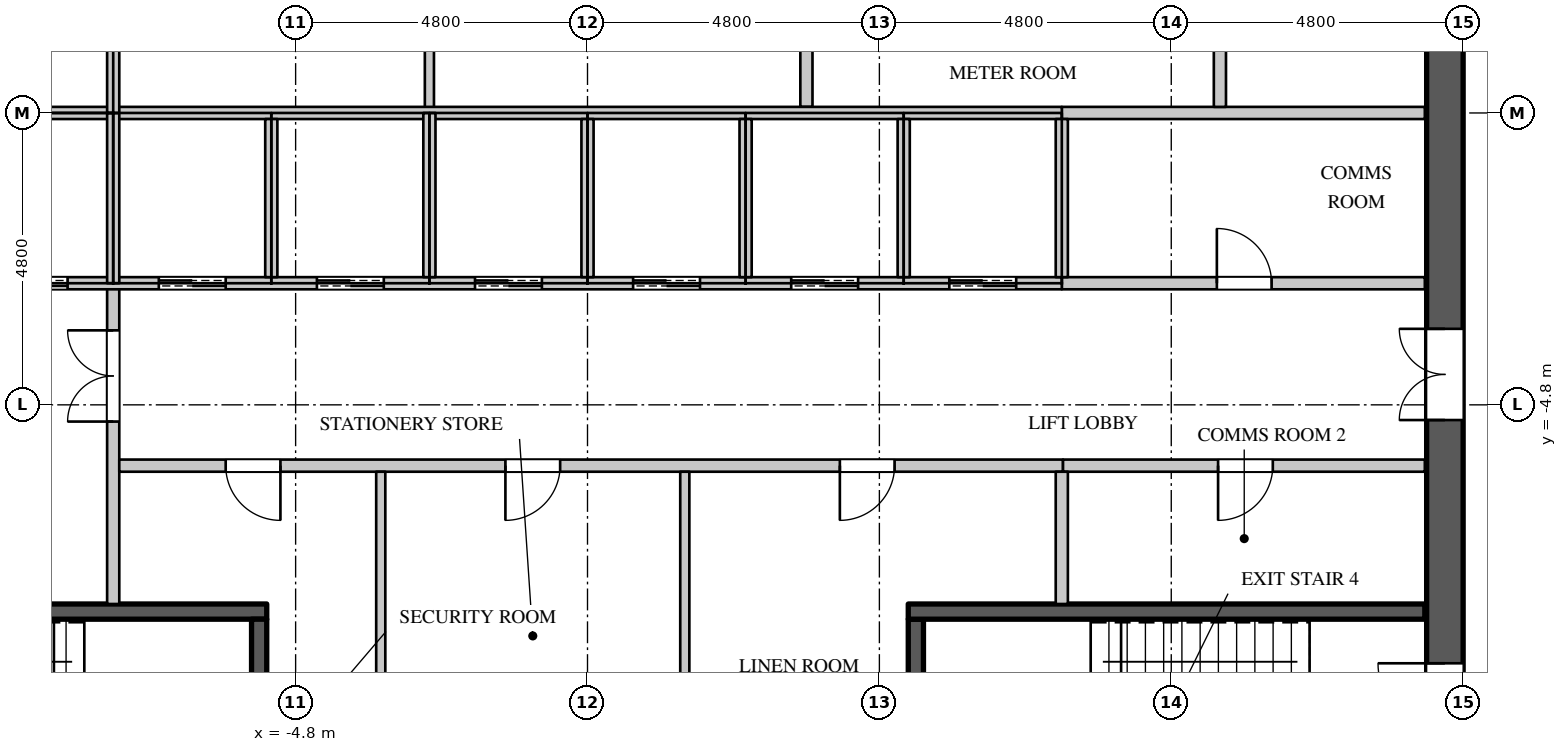
"""IFC4 building model, lengths in metres.
Left out: names, types, materials, properties, quantities, classifications, styles, units other than length and angle.
Written with IfcOpenShell. Run it as: python <this file> out.ifc"""

import sys

from ifc_helpers import new_model, si_unit, direction, frame, frame_2d, origin, place, context, subcontext, project, spatial, rectangle, extrude, element, fill, save


model = new_model("IFC4")
c1 = context("Model", 3, precision=1e-05, world=origin(), true_north=direction((0.0, 1.0)))
c2 = subcontext(c1, "Body", "Model", "MODEL_VIEW")
j1 = project(units=[si_unit("LENGTHUNIT", "METRE"), si_unit("PLANEANGLEUNIT", "RADIAN")], contexts=[c1])
p1 = place(None, origin())
s1 = spatial("IfcSite", under=j1, at=p1, CompositionType="ELEMENT")
p2 = place(p1, origin())
s2 = spatial("IfcBuilding", under=s1, at=p2, CompositionType="ELEMENT")
p3 = place(p2, frame((0.0, 0.0, 247.5)))
s3 = spatial("IfcBuildingStorey", under=s2, at=p3, CompositionType="ELEMENT", Elevation=247.5)
p4 = place(p3, frame((14.1, -11.4, 0.0), z_axis=(0.0, 0.0, 1.0), x_axis=(0.0, 1.0, 0.0)))
e1 = element("IfcWall", 1, at=p4, inside=s3, PredefinedType="SHEAR", context=c2, shape_type="SweptSolid", body=[
    extrude(rectangle(XDim=22.8, YDim=0.6, at=frame_2d((11.4, 0.0))), origin(), (0.0, 0.0, 1.0), 4.2),
])
p5 = place(p4, frame((20.45, 0.0, 0.0)))
e2 = element("IfcOpeningElement", 2, at=p5, cuts=e1, PredefinedType="OPENING", context=c2, shape_type="SweptSolid", body=[
    extrude(rectangle(XDim=1.1, YDim=2.2, at=frame_2d((0.55, 1.1))), frame((0.0, 0.31, 0.0), z_axis=(0.0, -1.0, 0.0), x_axis=(1.0, 0.0, 0.0)), (0.0, 0.0, 1.0), 0.62),
])
p6 = place(p4, frame((1.25, 0.0, 0.0)))
e3 = element("IfcOpeningElement", 3, at=p6, cuts=e1, PredefinedType="OPENING", context=c2, shape_type="SweptSolid", body=[
    extrude(rectangle(XDim=1.1, YDim=2.2, at=frame_2d((0.55, 1.1))), frame((0.0, 0.31, 0.0), z_axis=(0.0, -1.0, 0.0), x_axis=(1.0, 0.0, 0.0)), (0.0, 0.0, 1.0), 0.62),
])
p7 = place(p4, frame((14.95, 0.0, 0.0)))
e4 = element("IfcOpeningElement", 4, at=p7, cuts=e1, PredefinedType="OPENING", context=c2, shape_type="SweptSolid", body=[
    extrude(rectangle(XDim=1.5, YDim=2.4, at=frame_2d((0.75, 1.2))), frame((0.0, 0.31, 0.0), z_axis=(0.0, -1.0, 0.0), x_axis=(1.0, 0.0, 0.0)), (0.0, 0.0, 1.0), 0.62),
])
p8 = place(p4, frame((6.35, 0.0, 0.0)))
e5 = element("IfcOpeningElement", 5, at=p8, cuts=e1, PredefinedType="OPENING", context=c2, shape_type="SweptSolid", body=[
    extrude(rectangle(XDim=1.5, YDim=2.4, at=frame_2d((0.75, 1.2))), frame((0.0, 0.31, 0.0), z_axis=(0.0, -1.0, 0.0), x_axis=(1.0, 0.0, 0.0)), (0.0, 0.0, 1.0), 0.62),
])
p9 = place(p3, frame((-7.8, -8.075, 0.0), z_axis=(0.0, 0.0, 1.0), x_axis=(0.0, 1.0, 0.0)))
e6 = element("IfcWall", 6, at=p9, inside=s3, PredefinedType="PARTITIONING", context=c2, shape_type="SweptSolid", body=[
    extrude(rectangle(XDim=5.275, YDim=0.2, at=frame_2d((2.637, 0.0))), origin(), (0.0, 0.0, 1.0), 3.95),
])
p10 = place(p9, frame((3.0, 0.0, 0.0)))
e7 = element("IfcOpeningElement", 7, at=p10, cuts=e6, PredefinedType="OPENING", context=c2, shape_type="SweptSolid", body=[
    extrude(rectangle(XDim=1.5, YDim=2.4, at=frame_2d((0.75, 1.2))), frame((0.0, 0.11, 0.0), z_axis=(0.0, -1.0, 0.0), x_axis=(1.0, 0.0, 0.0)), (0.0, 0.0, 1.0), 0.22),
])
p11 = place(p3, frame((-7.7, -5.8, 0.0), z_axis=(0.0, 0.0, 1.0), x_axis=(1.0, 0.0, 0.0)))
e8 = element("IfcWall", 8, at=p11, inside=s3, PredefinedType="PARTITIONING", context=c2, shape_type="SweptSolid", body=[
    extrude(rectangle(XDim=15.52, YDim=0.2, at=frame_2d((7.76, 0.0))), origin(), (0.0, 0.0, 1.0), 3.95),
])
p12 = place(p11, frame((1.75, 0.0, 0.0)))
e9 = element("IfcOpeningElement", 9, at=p12, cuts=e8, PredefinedType="OPENING", context=c2, shape_type="SweptSolid", body=[
    extrude(rectangle(XDim=0.9, YDim=2.2, at=frame_2d((0.45, 1.1))), frame((0.0, 0.11, 0.0), z_axis=(0.0, -1.0, 0.0), x_axis=(1.0, 0.0, 0.0)), (0.0, 0.0, 1.0), 0.22),
])
p13 = place(p11, frame((6.35, 0.0, 0.0)))
e10 = element("IfcOpeningElement", 10, at=p13, cuts=e8, PredefinedType="OPENING", context=c2, shape_type="SweptSolid", body=[
    extrude(rectangle(XDim=0.9, YDim=2.2, at=frame_2d((0.45, 1.1))), frame((0.0, 0.11, 0.0), z_axis=(0.0, -1.0, 0.0), x_axis=(1.0, 0.0, 0.0)), (0.0, 0.0, 1.0), 0.22),
])
p14 = place(p11, frame((11.85, 0.0, 0.0)))
e11 = element("IfcOpeningElement", 11, at=p14, cuts=e8, PredefinedType="OPENING", context=c2, shape_type="SweptSolid", body=[
    extrude(rectangle(XDim=0.9, YDim=2.2, at=frame_2d((0.45, 1.1))), frame((0.0, 0.11, 0.0), z_axis=(0.0, -1.0, 0.0), x_axis=(1.0, 0.0, 0.0)), (0.0, 0.0, 1.0), 0.22),
])
p15 = place(p3, frame((-3.4, -11.37, 0.0), z_axis=(0.0, 0.0, 1.0), x_axis=(0.0, 1.0, 0.0)))
e12 = element("IfcWall", 12, at=p15, inside=s3, PredefinedType="PARTITIONING", context=c2, shape_type="SweptSolid", body=[
    extrude(rectangle(XDim=5.47, YDim=0.15, at=frame_2d((2.735, 0.0))), origin(), (0.0, 0.0, 1.0), 3.95),
])
p16 = place(p3, frame((-2.6, 0.0, 0.0), z_axis=(0.0, 0.0, 1.0), x_axis=(0.0, 1.0, 0.0)))
e13 = element("IfcWall", 13, at=p16, inside=s3, PredefinedType="PARTITIONING", context=c2, shape_type="SweptSolid", body=[
    extrude(rectangle(XDim=2.7, YDim=0.15, at=frame_2d((1.35, 0.0))), origin(), (0.0, 0.0, 1.0), 3.95),
])
p17 = place(p3, frame((1.6, -11.37, 0.0), z_axis=(0.0, 0.0, 1.0), x_axis=(0.0, 1.0, 0.0)))
e14 = element("IfcWall", 14, at=p17, inside=s3, PredefinedType="PARTITIONING", context=c2, shape_type="SweptSolid", body=[
    extrude(rectangle(XDim=5.47, YDim=0.15, at=frame_2d((2.735, 0.0))), origin(), (0.0, 0.0, 1.0), 3.95),
])
p18 = place(p3, frame((3.6, 0.1, 0.0), z_axis=(0.0, 0.0, 1.0), x_axis=(0.0, 1.0, 0.0)))
e15 = element("IfcWall", 15, at=p18, inside=s3, PredefinedType="PARTITIONING", context=c2, shape_type="SweptSolid", body=[
    extrude(rectangle(XDim=2.6, YDim=0.2, at=frame_2d((1.3, 0.0))), origin(), (0.0, 0.0, 1.0), 3.95),
])
p19 = place(p3, frame((7.82, -5.8, 0.0), z_axis=(0.0, 0.0, 1.0), x_axis=(1.0, 0.0, 0.0)))
e16 = element("IfcWall", 16, at=p19, inside=s3, PredefinedType="PARTITIONING", context=c2, shape_type="SweptSolid", body=[
    extrude(rectangle(XDim=5.95, YDim=0.2, at=frame_2d((2.975, 0.0))), origin(), (0.0, 0.0, 1.0), 3.95),
])
p20 = place(p19, frame((2.55, 0.0, 0.0)))
e17 = element("IfcOpeningElement", 17, at=p20, cuts=e16, PredefinedType="OPENING", context=c2, shape_type="SweptSolid", body=[
    extrude(rectangle(XDim=0.9, YDim=2.2, at=frame_2d((0.45, 1.1))), frame((0.0, 0.11, 0.0), z_axis=(0.0, -1.0, 0.0), x_axis=(1.0, 0.0, 0.0)), (0.0, 0.0, 1.0), 0.22),
])
p21 = place(p3, frame((7.8, -2.8, 0.0), z_axis=(0.0, 0.0, 1.0), x_axis=(1.0, 0.0, 0.0)))
e18 = element("IfcWall", 18, at=p21, inside=s3, PredefinedType="PARTITIONING", context=c2, shape_type="SweptSolid", body=[
    extrude(rectangle(XDim=5.97, YDim=0.2, at=frame_2d((2.985, 0.0))), origin(), (0.0, 0.0, 1.0), 3.95),
])
p22 = place(p21, frame((2.55, 0.0, 0.0)))
e19 = element("IfcOpeningElement", 19, at=p22, cuts=e18, PredefinedType="OPENING", context=c2, shape_type="SweptSolid", body=[
    extrude(rectangle(XDim=0.9, YDim=2.2, at=frame_2d((0.45, 1.1))), frame((0.0, 0.11, 0.0), z_axis=(0.0, -1.0, 0.0), x_axis=(1.0, 0.0, 0.0)), (0.0, 0.0, 1.0), 0.22),
])
p23 = place(p3, frame((7.8, -8.075, 0.0), z_axis=(0.0, 0.0, 1.0), x_axis=(0.0, 1.0, 0.0)))
e20 = element("IfcWall", 20, at=p23, inside=s3, PredefinedType="PARTITIONING", context=c2, shape_type="SweptSolid", body=[
    extrude(rectangle(XDim=2.175, YDim=0.2, at=frame_2d((1.087, 0.0))), origin(), (0.0, 0.0, 1.0), 3.95),
])
p24 = place(p3, frame((7.8, 0.0, 0.0), z_axis=(0.0, 0.0, 1.0), x_axis=(1.0, 0.0, 0.0)))
e21 = element("IfcWall", 21, at=p24, inside=s3, PredefinedType="PARTITIONING", context=c2, shape_type="SweptSolid", body=[
    extrude(rectangle(XDim=5.97, YDim=0.2, at=frame_2d((2.985, 0.0))), origin(), (0.0, 0.0, 1.0), 3.95),
])
p25 = place(p3, frame((10.4, 0.1, 0.0), z_axis=(0.0, 0.0, 1.0), x_axis=(0.0, 1.0, 0.0)))
e22 = element("IfcWall", 22, at=p25, inside=s3, PredefinedType="PARTITIONING", context=c2, shape_type="SweptSolid", body=[
    extrude(rectangle(XDim=2.6, YDim=0.2, at=frame_2d((1.3, 0.0))), origin(), (0.0, 0.0, 1.0), 3.95),
])
p26 = place(p3, frame((-13.77, 0.0, 0.0), z_axis=(0.0, 0.0, 1.0), x_axis=(1.0, 0.0, 0.0)))
e23 = element("IfcWall", 23, at=p26, inside=s3, PredefinedType="PARTITIONING", context=c2, shape_type="SweptSolid", body=[
    extrude(rectangle(XDim=21.57, YDim=0.2, at=frame_2d((10.785, 0.0))), origin(), (0.0, 0.0, 1.0), 3.95),
])
p27 = place(p3, frame((-10.4, -2.8, 0.0), z_axis=(0.0, 0.0, 1.0), x_axis=(1.0, 0.0, 0.0)))
e24 = element("IfcWall", 24, at=p27, inside=s3, PredefinedType="PARTITIONING", context=c2, shape_type="SweptSolid", body=[
    extrude(rectangle(XDim=18.2, YDim=0.2, at=frame_2d((9.1, 0.0))), origin(), (0.0, 0.0, 1.0), 3.95),
])
p28 = place(p27, frame((0.75, 0.0, 0.0)))
e25 = element("IfcOpeningElement", 25, at=p28, cuts=e24, PredefinedType="OPENING", context=c2, shape_type="SweptSolid", body=[
    extrude(rectangle(XDim=1.1, YDim=2.2, at=frame_2d((0.55, 1.1))), frame((0.0, 0.11, 0.0), z_axis=(0.0, -1.0, 0.0), x_axis=(1.0, 0.0, 0.0)), (0.0, 0.0, 1.0), 0.22),
])
p29 = place(p27, frame((3.35, 0.0, 0.0)))
e26 = element("IfcOpeningElement", 26, at=p29, cuts=e24, PredefinedType="OPENING", context=c2, shape_type="SweptSolid", body=[
    extrude(rectangle(XDim=1.1, YDim=2.2, at=frame_2d((0.55, 1.1))), frame((0.0, 0.11, 0.0), z_axis=(0.0, -1.0, 0.0), x_axis=(1.0, 0.0, 0.0)), (0.0, 0.0, 1.0), 0.22),
])
p30 = place(p27, frame((5.95, 0.0, 0.0)))
e27 = element("IfcOpeningElement", 27, at=p30, cuts=e24, PredefinedType="OPENING", context=c2, shape_type="SweptSolid", body=[
    extrude(rectangle(XDim=1.1, YDim=2.2, at=frame_2d((0.55, 1.1))), frame((0.0, 0.11, 0.0), z_axis=(0.0, -1.0, 0.0), x_axis=(1.0, 0.0, 0.0)), (0.0, 0.0, 1.0), 0.22),
])
p31 = place(p27, frame((8.55, 0.0, 0.0)))
e28 = element("IfcOpeningElement", 28, at=p31, cuts=e24, PredefinedType="OPENING", context=c2, shape_type="SweptSolid", body=[
    extrude(rectangle(XDim=1.1, YDim=2.2, at=frame_2d((0.55, 1.1))), frame((0.0, 0.11, 0.0), z_axis=(0.0, -1.0, 0.0), x_axis=(1.0, 0.0, 0.0)), (0.0, 0.0, 1.0), 0.22),
])
p32 = place(p27, frame((11.15, 0.0, 0.0)))
e29 = element("IfcOpeningElement", 29, at=p32, cuts=e24, PredefinedType="OPENING", context=c2, shape_type="SweptSolid", body=[
    extrude(rectangle(XDim=1.1, YDim=2.2, at=frame_2d((0.55, 1.1))), frame((0.0, 0.11, 0.0), z_axis=(0.0, -1.0, 0.0), x_axis=(1.0, 0.0, 0.0)), (0.0, 0.0, 1.0), 0.22),
])
p33 = place(p27, frame((13.75, 0.0, 0.0)))
e30 = element("IfcOpeningElement", 30, at=p33, cuts=e24, PredefinedType="OPENING", context=c2, shape_type="SweptSolid", body=[
    extrude(rectangle(XDim=1.1, YDim=2.2, at=frame_2d((0.55, 1.1))), frame((0.0, 0.11, 0.0), z_axis=(0.0, -1.0, 0.0), x_axis=(1.0, 0.0, 0.0)), (0.0, 0.0, 1.0), 0.22),
])
p34 = place(p27, frame((16.35, 0.0, 0.0)))
e31 = element("IfcOpeningElement", 31, at=p34, cuts=e24, PredefinedType="OPENING", context=c2, shape_type="SweptSolid", body=[
    extrude(rectangle(XDim=1.1, YDim=2.2, at=frame_2d((0.55, 1.1))), frame((0.0, 0.11, 0.0), z_axis=(0.0, -1.0, 0.0), x_axis=(1.0, 0.0, 0.0)), (0.0, 0.0, 1.0), 0.22),
])
for number, where, z_axis, x_axis in (
    (32, (-7.8, -2.8, 0.0), (0.0, 0.0, 1.0), (0.0, 1.0, 0.0)),
    (33, (-7.8, 0.0, 0.0), (0.0, 0.0, 1.0), (0.0, 1.0, 0.0)),
):
    element("IfcWall", number, at=place(p3, frame(where, z_axis=z_axis, x_axis=x_axis)), inside=s3, PredefinedType="PARTITIONING", context=c2, shape_type="SweptSolid", body=[
        extrude(rectangle(XDim=2.8, YDim=0.2, at=frame_2d((1.4, 0.0))), origin(), (0.0, 0.0, 1.0), 3.95),
    ])
p35 = place(p3, frame((-5.2, -2.7, 0.0), z_axis=(0.0, 0.0, 1.0), x_axis=(0.0, 1.0, 0.0)))
e34 = element("IfcWall", 34, at=p35, inside=s3, PredefinedType="PARTITIONING", context=c2, shape_type="SweptSolid", body=[
    extrude(rectangle(XDim=2.6, YDim=0.2, at=frame_2d((1.3, 0.0))), origin(), (0.0, 0.0, 1.0), 3.95),
])
p36 = place(p3, frame((-2.6, -2.7, 0.0), z_axis=(0.0, 0.0, 1.0), x_axis=(0.0, 1.0, 0.0)))
e35 = element("IfcWall", 35, at=p36, inside=s3, PredefinedType="PARTITIONING", context=c2, shape_type="SweptSolid", body=[
    extrude(rectangle(XDim=2.7, YDim=0.2, at=frame_2d((1.35, 0.0))), origin(), (0.0, 0.0, 1.0), 3.95),
])
for number, where, z_axis, x_axis in (
    (36, (0.0, -2.7, 0.0), (0.0, 0.0, 1.0), (0.0, 1.0, 0.0)),
    (37, (2.6, -2.7, 0.0), (0.0, 0.0, 1.0), (0.0, 1.0, 0.0)),
    (38, (5.2, -2.7, 0.0), (0.0, 0.0, 1.0), (0.0, 1.0, 0.0)),
    (39, (7.8, -2.7, 0.0), (0.0, 0.0, 1.0), (0.0, 1.0, 0.0)),
):
    element("IfcWall", number, at=place(p3, frame(where, z_axis=z_axis, x_axis=x_axis)), inside=s3, PredefinedType="PARTITIONING", context=c2, shape_type="SweptSolid", body=[
        extrude(rectangle(XDim=2.6, YDim=0.2, at=frame_2d((1.3, 0.0))), origin(), (0.0, 0.0, 1.0), 3.95),
    ])
p37 = place(p3, frame((-13.77, -8.2, 0.0), z_axis=(0.0, 0.0, 1.0), x_axis=(1.0, 0.0, 0.0)))
e40 = element("IfcWall", 40, at=p37, inside=s3, PredefinedType="SHEAR", context=c2, shape_type="SweptSolid", body=[
    extrude(rectangle(XDim=8.495, YDim=0.25, at=frame_2d((4.248, 0.0))), origin(), (0.0, 0.0, 1.0), 3.95),
])
p38 = place(p37, frame((0.15, 0.0, 0.0)))
e41 = element("IfcOpeningElement", 41, at=p38, cuts=e40, PredefinedType="OPENING", context=c2, shape_type="SweptSolid", body=[
    extrude(rectangle(XDim=1.1, YDim=2.2, at=frame_2d((0.55, 1.1))), frame((0.0, 0.135, 0.0), z_axis=(0.0, -1.0, 0.0), x_axis=(1.0, 0.0, 0.0)), (0.0, 0.0, 1.0), 0.27),
])
for number, where, z_axis, x_axis in (
    (42, (-5.4, -11.37, 0.0), (0.0, 0.0, 1.0), (0.0, 1.0, 0.0)),
    (43, (5.4, -11.37, 0.0), (0.0, 0.0, 1.0), (0.0, 1.0, 0.0)),
):
    element("IfcWall", number, at=place(p3, frame(where, z_axis=z_axis, x_axis=x_axis)), inside=s3, PredefinedType="SHEAR", context=c2, shape_type="SweptSolid", body=[
        extrude(rectangle(XDim=3.045, YDim=0.25, at=frame_2d((1.522, 0.0))), origin(), (0.0, 0.0, 1.0), 3.95),
    ])
p39 = place(p3, frame((5.275, -8.2, 0.0), z_axis=(0.0, 0.0, 1.0), x_axis=(1.0, 0.0, 0.0)))
e44 = element("IfcWall", 44, at=p39, inside=s3, PredefinedType="SHEAR", context=c2, shape_type="SweptSolid", body=[
    extrude(rectangle(XDim=8.495, YDim=0.25, at=frame_2d((4.248, 0.0))), origin(), (0.0, 0.0, 1.0), 3.95),
])
p40 = place(p22, origin())
e45 = element("IfcDoor", 45, at=p40, inside=s3, OperationType="SINGLE_SWING_LEFT", PredefinedType="DOOR", context=c2, shape_type="SweptSolid", body=[
    extrude(rectangle(XDim=0.9, YDim=2.2, at=frame_2d((0.45, 1.1))), frame((0.0, 0.025, 0.0), z_axis=(0.0, -1.0, 0.0), x_axis=(1.0, 0.0, 0.0)), (0.0, 0.0, 1.0), 0.05),
])
fill(e19, e45)
p41 = place(p12, origin())
e46 = element("IfcDoor", 46, at=p41, inside=s3, OperationType="SINGLE_SWING_LEFT", PredefinedType="DOOR", context=c2, shape_type="SweptSolid", body=[
    extrude(rectangle(XDim=0.9, YDim=2.2, at=frame_2d((0.45, 1.1))), frame((0.0, 0.025, 0.0), z_axis=(0.0, -1.0, 0.0), x_axis=(1.0, 0.0, 0.0)), (0.0, 0.0, 1.0), 0.05),
])
fill(e9, e46)
p42 = place(p13, origin())
e47 = element("IfcDoor", 47, at=p42, inside=s3, OperationType="SINGLE_SWING_RIGHT", PredefinedType="DOOR", context=c2, shape_type="SweptSolid", body=[
    extrude(rectangle(XDim=0.9, YDim=2.2, at=frame_2d((0.45, 1.1))), frame((0.0, 0.025, 0.0), z_axis=(0.0, -1.0, 0.0), x_axis=(1.0, 0.0, 0.0)), (0.0, 0.0, 1.0), 0.05),
])
fill(e10, e47)
p43 = place(p14, origin())
e48 = element("IfcDoor", 48, at=p43, inside=s3, OperationType="SINGLE_SWING_RIGHT", PredefinedType="DOOR", context=c2, shape_type="SweptSolid", body=[
    extrude(rectangle(XDim=0.9, YDim=2.2, at=frame_2d((0.45, 1.1))), frame((0.0, 0.025, 0.0), z_axis=(0.0, -1.0, 0.0), x_axis=(1.0, 0.0, 0.0)), (0.0, 0.0, 1.0), 0.05),
])
fill(e11, e48)
p44 = place(p20, origin())
e49 = element("IfcDoor", 49, at=p44, inside=s3, OperationType="SINGLE_SWING_RIGHT", PredefinedType="DOOR", context=c2, shape_type="SweptSolid", body=[
    extrude(rectangle(XDim=0.9, YDim=2.2, at=frame_2d((0.45, 1.1))), frame((0.0, 0.025, 0.0), z_axis=(0.0, -1.0, 0.0), x_axis=(1.0, 0.0, 0.0)), (0.0, 0.0, 1.0), 0.05),
])
fill(e17, e49)
p45 = place(p28, origin())
e50 = element("IfcDoor", 50, at=p45, inside=s3, OperationType="DOUBLE_DOOR_SLIDING", PredefinedType="DOOR", context=c2, shape_type="SweptSolid", body=[
    extrude(rectangle(XDim=1.1, YDim=2.2, at=frame_2d((0.55, 1.1))), frame((0.0, 0.025, 0.0), z_axis=(0.0, -1.0, 0.0), x_axis=(1.0, 0.0, 0.0)), (0.0, 0.0, 1.0), 0.05),
])
fill(e25, e50)
p46 = place(p29, origin())
e51 = element("IfcDoor", 51, at=p46, inside=s3, OperationType="DOUBLE_DOOR_SLIDING", PredefinedType="DOOR", context=c2, shape_type="SweptSolid", body=[
    extrude(rectangle(XDim=1.1, YDim=2.2, at=frame_2d((0.55, 1.1))), frame((0.0, 0.025, 0.0), z_axis=(0.0, -1.0, 0.0), x_axis=(1.0, 0.0, 0.0)), (0.0, 0.0, 1.0), 0.05),
])
fill(e26, e51)
p47 = place(p30, origin())
e52 = element("IfcDoor", 52, at=p47, inside=s3, OperationType="DOUBLE_DOOR_SLIDING", PredefinedType="DOOR", context=c2, shape_type="SweptSolid", body=[
    extrude(rectangle(XDim=1.1, YDim=2.2, at=frame_2d((0.55, 1.1))), frame((0.0, 0.025, 0.0), z_axis=(0.0, -1.0, 0.0), x_axis=(1.0, 0.0, 0.0)), (0.0, 0.0, 1.0), 0.05),
])
fill(e27, e52)
p48 = place(p31, origin())
e53 = element("IfcDoor", 53, at=p48, inside=s3, OperationType="DOUBLE_DOOR_SLIDING", PredefinedType="DOOR", context=c2, shape_type="SweptSolid", body=[
    extrude(rectangle(XDim=1.1, YDim=2.2, at=frame_2d((0.55, 1.1))), frame((0.0, 0.025, 0.0), z_axis=(0.0, -1.0, 0.0), x_axis=(1.0, 0.0, 0.0)), (0.0, 0.0, 1.0), 0.05),
])
fill(e28, e53)
p49 = place(p32, origin())
e54 = element("IfcDoor", 54, at=p49, inside=s3, OperationType="DOUBLE_DOOR_SLIDING", PredefinedType="DOOR", context=c2, shape_type="SweptSolid", body=[
    extrude(rectangle(XDim=1.1, YDim=2.2, at=frame_2d((0.55, 1.1))), frame((0.0, 0.025, 0.0), z_axis=(0.0, -1.0, 0.0), x_axis=(1.0, 0.0, 0.0)), (0.0, 0.0, 1.0), 0.05),
])
fill(e29, e54)
p50 = place(p33, origin())
e55 = element("IfcDoor", 55, at=p50, inside=s3, OperationType="DOUBLE_DOOR_SLIDING", PredefinedType="DOOR", context=c2, shape_type="SweptSolid", body=[
    extrude(rectangle(XDim=1.1, YDim=2.2, at=frame_2d((0.55, 1.1))), frame((0.0, 0.025, 0.0), z_axis=(0.0, -1.0, 0.0), x_axis=(1.0, 0.0, 0.0)), (0.0, 0.0, 1.0), 0.05),
])
fill(e30, e55)
p51 = place(p34, origin())
e56 = element("IfcDoor", 56, at=p51, inside=s3, OperationType="DOUBLE_DOOR_SLIDING", PredefinedType="DOOR", context=c2, shape_type="SweptSolid", body=[
    extrude(rectangle(XDim=1.1, YDim=2.2, at=frame_2d((0.55, 1.1))), frame((0.0, 0.025, 0.0), z_axis=(0.0, -1.0, 0.0), x_axis=(1.0, 0.0, 0.0)), (0.0, 0.0, 1.0), 0.05),
])
fill(e31, e56)
p52 = place(p10, origin())
e57 = element("IfcDoor", 57, at=p52, inside=s3, OperationType="DOUBLE_DOOR_SINGLE_SWING", PredefinedType="DOOR", context=c2, shape_type="SweptSolid", body=[
    extrude(rectangle(XDim=1.5, YDim=2.4, at=frame_2d((0.75, 1.2))), frame((0.0, 0.025, 0.0), z_axis=(0.0, -1.0, 0.0), x_axis=(1.0, 0.0, 0.0)), (0.0, 0.0, 1.0), 0.05),
])
fill(e7, e57)
p53 = place(p6, origin())
e58 = element("IfcDoor", 58, at=p53, inside=s3, OperationType="SINGLE_SWING_RIGHT", PredefinedType="DOOR", context=c2, shape_type="SweptSolid", body=[
    extrude(rectangle(XDim=1.1, YDim=2.2, at=frame_2d((0.55, 1.1))), frame((0.0, 0.295, 0.0), z_axis=(0.0, -1.0, 0.0), x_axis=(1.0, 0.0, 0.0)), (0.0, 0.0, 1.0), 0.05),
])
fill(e3, e58)
p54 = place(p8, origin())
e59 = element("IfcDoor", 59, at=p54, inside=s3, OperationType="DOUBLE_DOOR_SINGLE_SWING", PredefinedType="DOOR", context=c2, shape_type="SweptSolid", body=[
    extrude(rectangle(XDim=1.5, YDim=2.4, at=frame_2d((0.75, 1.2))), frame((0.0, 0.295, 0.0), z_axis=(0.0, -1.0, 0.0), x_axis=(1.0, 0.0, 0.0)), (0.0, 0.0, 1.0), 0.05),
])
fill(e5, e59)
save(model, sys.argv[1])
